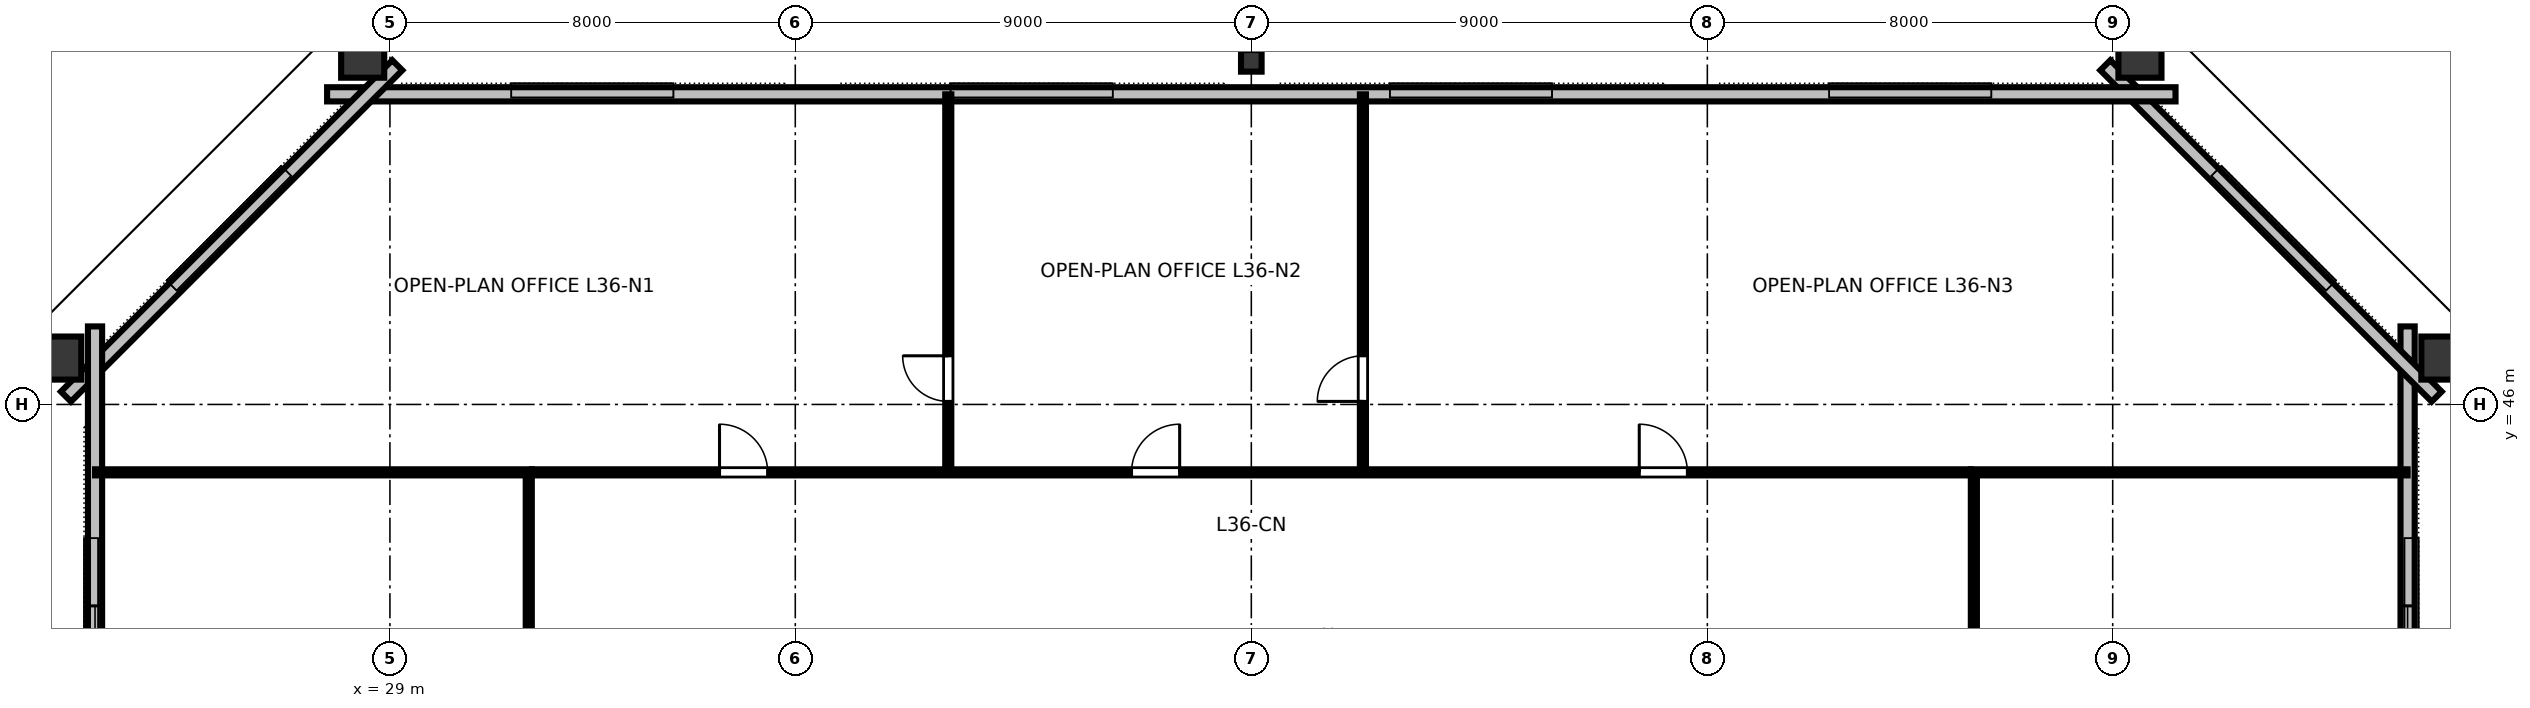
"""IFC4 building model, lengths in metres.
Left out: names, types, materials, properties, quantities, classifications, styles, units other than length and angle.
Written with IfcOpenShell. Run it as: python <this file> out.ifc"""

import sys

from ifc_helpers import new_model, si_unit, direction, frame, frame_2d, origin, origin_2d, place, context, subcontext, project, spatial, rectangle, hollow_rectangle, i_section, extrude, element, fill, save


model = new_model("IFC4")
c1 = context("Model", 3, precision=1e-05, world=origin(), true_north=direction((0.0, 1.0)))
c2 = subcontext(c1, "Body", "Model", "MODEL_VIEW")
j1 = project(units=[si_unit("LENGTHUNIT", "METRE"), si_unit("PLANEANGLEUNIT", "RADIAN")], contexts=[c1])
p1 = place(None, origin())
s1 = spatial("IfcSite", under=j1, at=p1, CompositionType="ELEMENT")
p2 = place(p1, origin())
s2 = spatial("IfcBuilding", under=s1, at=p2, CompositionType="ELEMENT")
p3 = place(p2, frame((0.0, 0.0, 138.4)))
s3 = spatial("IfcBuildingStorey", under=s2, at=p3, CompositionType="ELEMENT", Elevation=138.4)
for number, where, z_axis, x_axis in (
    (1, (69.591, 46.915, 0.0), (0.0, 0.0, 1.0), (0.0, 1.0, 0.0)),
    (2, (63.538, 52.948, 0.0), (0.0, 0.0, 1.0), (1.0, 0.0, 0.0)),
):
    element("IfcColumn", number, at=place(p3, frame(where, z_axis=z_axis, x_axis=x_axis)), inside=s3, PredefinedType="COLUMN", context=c2, shape_type="SweptSolid", body=[
        extrude(hollow_rectangle(XDim=0.85, YDim=1.0, WallThickness=0.05, at=origin_2d()), origin(), (0.0, 0.0, 1.0), 3.358),
    ])
p4 = place(p3, frame((46.0, 52.78, 0.0), z_axis=(0.0, 0.0, 1.0), x_axis=(1.0, 0.0, 0.0)))
e3 = element("IfcColumn", 3, at=p4, inside=s3, PredefinedType="COLUMN", context=c2, shape_type="SweptSolid", body=[
    extrude(i_section(OverallWidth=0.406, OverallDepth=0.425, WebThickness=0.033, FlangeThickness=0.052, FilletRadius=0.025, at=origin_2d()), origin(), (0.0, 0.0, 1.0), 3.358),
])
for number, where, z_axis, x_axis in (
    (4, (28.462, 52.948, 0.0), (0.0, 0.0, 1.0), (1.0, 0.0, 0.0)),
    (5, (22.409, 46.915, 0.0), (0.0, 0.0, 1.0), (0.0, 1.0, 0.0)),
):
    element("IfcColumn", number, at=place(p3, frame(where, z_axis=z_axis, x_axis=x_axis)), inside=s3, PredefinedType="COLUMN", context=c2, shape_type="SweptSolid", body=[
        extrude(hollow_rectangle(XDim=0.85, YDim=1.0, WallThickness=0.05, at=origin_2d()), origin(), (0.0, 0.0, 1.0), 3.358),
    ])
p5 = place(p3, frame((68.82, 16.46, 0.0), z_axis=(0.0, 0.0, 1.0), x_axis=(0.0, 1.0, 0.0)))
e6 = element("IfcWall", 6, at=p5, inside=s3, PredefinedType="STANDARD", context=c2, shape_type="SweptSolid", body=[
    extrude(rectangle(XDim=31.08, YDim=0.28, at=frame_2d((15.54, 0.0))), origin(), (0.0, 0.0, 1.0), 3.36),
])
p6 = place(p5, frame((11.86, 0.0, 0.0)))
e7 = element("IfcOpeningElement", 7, at=p6, cuts=e6, PredefinedType="OPENING", context=c2, shape_type="SweptSolid", body=[
    extrude(rectangle(XDim=1.4, YDim=2.15, at=frame_2d((0.7, 1.075))), frame((0.0, 0.15, 0.0), z_axis=(0.0, -1.0, 0.0), x_axis=(1.0, 0.0, 0.0)), (0.0, 0.0, 1.0), 0.3),
])
p7 = place(p5, frame((5.515, 0.0, 0.8)))
e8 = element("IfcOpeningElement", 8, at=p7, cuts=e6, PredefinedType="OPENING", context=c2, shape_type="SweptSolid", body=[
    extrude(rectangle(XDim=2.0, YDim=1.95, at=frame_2d((1.0, 0.975))), frame((0.0, 0.15, 0.0), z_axis=(0.0, -1.0, 0.0), x_axis=(1.0, 0.0, 0.0)), (0.0, 0.0, 1.0), 0.3),
])
p8 = place(p5, frame((9.125, 0.0, 0.8)))
e9 = element("IfcOpeningElement", 9, at=p8, cuts=e6, PredefinedType="OPENING", context=c2, shape_type="SweptSolid", body=[
    extrude(rectangle(XDim=2.0, YDim=1.95, at=frame_2d((1.0, 0.975))), frame((0.0, 0.15, 0.0), z_axis=(0.0, -1.0, 0.0), x_axis=(1.0, 0.0, 0.0)), (0.0, 0.0, 1.0), 0.3),
])
p9 = place(p5, frame((19.955, 0.0, 0.8)))
e10 = element("IfcOpeningElement", 10, at=p9, cuts=e6, PredefinedType="OPENING", context=c2, shape_type="SweptSolid", body=[
    extrude(rectangle(XDim=2.0, YDim=1.95, at=frame_2d((1.0, 0.975))), frame((0.0, 0.15, 0.0), z_axis=(0.0, -1.0, 0.0), x_axis=(1.0, 0.0, 0.0)), (0.0, 0.0, 1.0), 0.3),
])
p10 = place(p5, frame((23.565, 0.0, 0.8)))
e11 = element("IfcOpeningElement", 11, at=p10, cuts=e6, PredefinedType="OPENING", context=c2, shape_type="SweptSolid", body=[
    extrude(rectangle(XDim=2.0, YDim=1.95, at=frame_2d((1.0, 0.975))), frame((0.0, 0.15, 0.0), z_axis=(0.0, -1.0, 0.0), x_axis=(1.0, 0.0, 0.0)), (0.0, 0.0, 1.0), 0.3),
])
p11 = place(p3, frame((69.394, 46.155, 0.0), z_axis=(0.0, 0.0, 1.0), x_axis=(-0.707106781187, 0.707106781187, 0.0)))
e12 = element("IfcWall", 12, at=p11, inside=s3, PredefinedType="STANDARD", context=c2, shape_type="SweptSolid", body=[
    extrude(rectangle(XDim=9.248, YDim=0.28, at=frame_2d((4.624, 0.0))), origin(), (0.0, 0.0, 1.0), 3.36),
])
p12 = place(p3, frame((64.24, 52.12, 0.0), z_axis=(0.0, 0.0, 1.0), x_axis=(-1.0, 0.0, 0.0)))
e13 = element("IfcWall", 13, at=p12, inside=s3, PredefinedType="STANDARD", context=c2, shape_type="SweptSolid", body=[
    extrude(rectangle(XDim=36.48, YDim=0.28, at=frame_2d((18.24, 0.0))), origin(), (0.0, 0.0, 1.0), 3.36),
])
p13 = place(p3, frame((29.146, 52.694, 0.0), z_axis=(0.0, 0.0, 1.0), x_axis=(-0.707106781187, -0.707106781187, 0.0)))
e14 = element("IfcWall", 14, at=p13, inside=s3, PredefinedType="STANDARD", context=c2, shape_type="SweptSolid", body=[
    extrude(rectangle(XDim=9.248, YDim=0.28, at=frame_2d((4.624, 0.0))), origin(), (0.0, 0.0, 1.0), 3.36),
])
p14 = place(p3, frame((23.18, 47.54, 0.0), z_axis=(0.0, 0.0, 1.0), x_axis=(0.0, -1.0, 0.0)))
e15 = element("IfcWall", 15, at=p14, inside=s3, PredefinedType="STANDARD", context=c2, shape_type="SweptSolid", body=[
    extrude(rectangle(XDim=31.08, YDim=0.28, at=frame_2d((15.54, 0.0))), origin(), (0.0, 0.0, 1.0), 3.36),
])
p15 = place(p14, frame((11.86, 0.0, 0.0)))
e16 = element("IfcOpeningElement", 16, at=p15, cuts=e15, PredefinedType="OPENING", context=c2, shape_type="SweptSolid", body=[
    extrude(rectangle(XDim=1.4, YDim=2.15, at=frame_2d((0.7, 1.075))), frame((0.0, 0.15, 0.0), z_axis=(0.0, -1.0, 0.0), x_axis=(1.0, 0.0, 0.0)), (0.0, 0.0, 1.0), 0.3),
])
p16 = place(p14, frame((5.515, 0.0, 0.8)))
e17 = element("IfcOpeningElement", 17, at=p16, cuts=e15, PredefinedType="OPENING", context=c2, shape_type="SweptSolid", body=[
    extrude(rectangle(XDim=2.0, YDim=1.95, at=frame_2d((1.0, 0.975))), frame((0.0, 0.15, 0.0), z_axis=(0.0, -1.0, 0.0), x_axis=(1.0, 0.0, 0.0)), (0.0, 0.0, 1.0), 0.3),
])
p17 = place(p14, frame((9.125, 0.0, 0.8)))
e18 = element("IfcOpeningElement", 18, at=p17, cuts=e15, PredefinedType="OPENING", context=c2, shape_type="SweptSolid", body=[
    extrude(rectangle(XDim=2.0, YDim=1.95, at=frame_2d((1.0, 0.975))), frame((0.0, 0.15, 0.0), z_axis=(0.0, -1.0, 0.0), x_axis=(1.0, 0.0, 0.0)), (0.0, 0.0, 1.0), 0.3),
])
p18 = place(p14, frame((19.955, 0.0, 0.8)))
e19 = element("IfcOpeningElement", 19, at=p18, cuts=e15, PredefinedType="OPENING", context=c2, shape_type="SweptSolid", body=[
    extrude(rectangle(XDim=2.0, YDim=1.95, at=frame_2d((1.0, 0.975))), frame((0.0, 0.15, 0.0), z_axis=(0.0, -1.0, 0.0), x_axis=(1.0, 0.0, 0.0)), (0.0, 0.0, 1.0), 0.3),
])
p19 = place(p14, frame((23.565, 0.0, 0.8)))
e20 = element("IfcOpeningElement", 20, at=p19, cuts=e15, PredefinedType="OPENING", context=c2, shape_type="SweptSolid", body=[
    extrude(rectangle(XDim=2.0, YDim=1.95, at=frame_2d((1.0, 0.975))), frame((0.0, 0.15, 0.0), z_axis=(0.0, -1.0, 0.0), x_axis=(1.0, 0.0, 0.0)), (0.0, 0.0, 1.0), 0.3),
])
p20 = place(p3, frame((40.019, 44.66, 0.0), z_axis=(0.0, 0.0, 1.0), x_axis=(0.0, 1.0, 0.0)))
e21 = element("IfcWall", 21, at=p20, inside=s3, PredefinedType="PARTITIONING", context=c2, shape_type="SweptSolid", body=[
    extrude(rectangle(XDim=7.46, YDim=0.12, at=frame_2d((3.73, 0.0))), origin(), (0.0, 0.0, 1.0), 2.64),
])
p21 = place(p20, frame((1.4, 0.0, 0.0)))
e22 = element("IfcOpeningElement", 22, at=p21, cuts=e21, PredefinedType="OPENING", context=c2, shape_type="SweptSolid", body=[
    extrude(rectangle(XDim=0.9, YDim=2.15, at=frame_2d((0.45, 1.075))), frame((0.0, 0.07, 0.0), z_axis=(0.0, -1.0, 0.0), x_axis=(1.0, 0.0, 0.0)), (0.0, 0.0, 1.0), 0.14),
])
p22 = place(p3, frame((48.202, 44.66, 0.0), z_axis=(0.0, 0.0, 1.0), x_axis=(0.0, 1.0, 0.0)))
e23 = element("IfcWall", 23, at=p22, inside=s3, PredefinedType="PARTITIONING", context=c2, shape_type="SweptSolid", body=[
    extrude(rectangle(XDim=7.46, YDim=0.12, at=frame_2d((3.73, 0.0))), origin(), (0.0, 0.0, 1.0), 2.64),
])
p23 = place(p22, frame((1.4, 0.0, 0.0)))
e24 = element("IfcOpeningElement", 24, at=p23, cuts=e23, PredefinedType="OPENING", context=c2, shape_type="SweptSolid", body=[
    extrude(rectangle(XDim=0.9, YDim=2.15, at=frame_2d((0.45, 1.075))), frame((0.0, 0.07, 0.0), z_axis=(0.0, -1.0, 0.0), x_axis=(1.0, 0.0, 0.0)), (0.0, 0.0, 1.0), 0.14),
])
p24 = place(p3, frame((31.8, 44.66, 0.0), z_axis=(0.0, 0.0, 1.0), x_axis=(1.0, 0.0, 0.0)))
e25 = element("IfcWall", 25, at=p24, inside=s3, PredefinedType="PARTITIONING", context=c2, shape_type="SweptSolid", body=[
    extrude(rectangle(XDim=28.4, YDim=0.12, at=frame_2d((14.2, 0.0))), origin(), (0.0, 0.0, 1.0), 2.64),
])
p25 = place(p24, frame((3.705, 0.0, 0.0)))
e26 = element("IfcOpeningElement", 26, at=p25, cuts=e25, PredefinedType="OPENING", context=c2, shape_type="SweptSolid", body=[
    extrude(rectangle(XDim=0.95, YDim=2.15, at=frame_2d((0.475, 1.075))), frame((0.0, 0.07, 0.0), z_axis=(0.0, -1.0, 0.0), x_axis=(1.0, 0.0, 0.0)), (0.0, 0.0, 1.0), 0.14),
])
p26 = place(p24, frame((11.836, 0.0, 0.0)))
e27 = element("IfcOpeningElement", 27, at=p26, cuts=e25, PredefinedType="OPENING", context=c2, shape_type="SweptSolid", body=[
    extrude(rectangle(XDim=0.95, YDim=2.15, at=frame_2d((0.475, 1.075))), frame((0.0, 0.07, 0.0), z_axis=(0.0, -1.0, 0.0), x_axis=(1.0, 0.0, 0.0)), (0.0, 0.0, 1.0), 0.14),
])
p27 = place(p24, frame((21.856, 0.0, 0.0)))
e28 = element("IfcOpeningElement", 28, at=p27, cuts=e25, PredefinedType="OPENING", context=c2, shape_type="SweptSolid", body=[
    extrude(rectangle(XDim=0.95, YDim=2.15, at=frame_2d((0.475, 1.075))), frame((0.0, 0.07, 0.0), z_axis=(0.0, -1.0, 0.0), x_axis=(1.0, 0.0, 0.0)), (0.0, 0.0, 1.0), 0.14),
])
p28 = place(p3, frame((31.74, 33.02, 0.0), z_axis=(0.0, 0.0, 1.0), x_axis=(0.0, 1.0, 0.0)))
e29 = element("IfcWall", 29, at=p28, inside=s3, PredefinedType="PARTITIONING", context=c2, shape_type="SweptSolid", body=[
    extrude(rectangle(XDim=11.58, YDim=0.12, at=frame_2d((5.79, 0.0))), origin(), (0.0, 0.0, 1.0), 2.64),
])
p29 = place(p28, frame((5.215, 0.0, 0.0)))
e30 = element("IfcOpeningElement", 30, at=p29, cuts=e29, PredefinedType="OPENING", context=c2, shape_type="SweptSolid", body=[
    extrude(rectangle(XDim=0.95, YDim=2.15, at=frame_2d((0.475, 1.075))), frame((0.0, 0.07, 0.0), z_axis=(0.0, -1.0, 0.0), x_axis=(1.0, 0.0, 0.0)), (0.0, 0.0, 1.0), 0.14),
])
p30 = place(p3, frame((60.26, 33.02, 0.0), z_axis=(0.0, 0.0, 1.0), x_axis=(0.0, 1.0, 0.0)))
e31 = element("IfcWall", 31, at=p30, inside=s3, PredefinedType="PARTITIONING", context=c2, shape_type="SweptSolid", body=[
    extrude(rectangle(XDim=11.58, YDim=0.12, at=frame_2d((5.79, 0.0))), origin(), (0.0, 0.0, 1.0), 2.64),
])
p31 = place(p30, frame((5.775, 0.0, 0.0)))
e32 = element("IfcOpeningElement", 32, at=p31, cuts=e31, PredefinedType="OPENING", context=c2, shape_type="SweptSolid", body=[
    extrude(rectangle(XDim=0.95, YDim=2.15, at=frame_2d((0.475, 1.075))), frame((0.0, 0.07, 0.0), z_axis=(0.0, -1.0, 0.0), x_axis=(1.0, 0.0, 0.0)), (0.0, 0.0, 1.0), 0.14),
])
for number, where, z_axis, x_axis in (
    (33, (31.8, 44.66, 0.0), (0.0, 0.0, 1.0), (-1.0, 0.0, 0.0)),
    (34, (60.2, 44.66, 0.0), (0.0, 0.0, 1.0), (1.0, 0.0, 0.0)),
):
    element("IfcWall", number, at=place(p3, frame(where, z_axis=z_axis, x_axis=x_axis)), inside=s3, PredefinedType="PARTITIONING", context=c2, shape_type="SweptSolid", body=[
        extrude(rectangle(XDim=8.62, YDim=0.12, at=frame_2d((4.31, 0.0))), origin(), (0.0, 0.0, 1.0), 2.64),
    ])
p32 = place(p10, origin())
e35 = element("IfcWindow", 35, at=p32, inside=s3, PartitioningType="SINGLE_PANEL", PredefinedType="WINDOW", context=c2, shape_type="SweptSolid", body=[
    extrude(rectangle(XDim=2.0, YDim=1.95, at=frame_2d((1.0, 0.975))), frame((0.0, 0.03, 0.0), z_axis=(0.0, -1.0, 0.0), x_axis=(1.0, 0.0, 0.0)), (0.0, 0.0, 1.0), 0.06),
])
fill(e11, e35)
p33 = place(p16, origin())
e36 = element("IfcWindow", 36, at=p33, inside=s3, PartitioningType="SINGLE_PANEL", PredefinedType="WINDOW", context=c2, shape_type="SweptSolid", body=[
    extrude(rectangle(XDim=2.0, YDim=1.95, at=frame_2d((1.0, 0.975))), frame((0.0, 0.03, 0.0), z_axis=(0.0, -1.0, 0.0), x_axis=(1.0, 0.0, 0.0)), (0.0, 0.0, 1.0), 0.06),
])
fill(e17, e36)
p34 = place(p21, origin())
e37 = element("IfcDoor", 37, at=p34, inside=s3, OperationType="SINGLE_SWING_RIGHT", PredefinedType="DOOR", context=c2, shape_type="SweptSolid", body=[
    extrude(rectangle(XDim=0.9, YDim=2.15, at=frame_2d((0.45, 1.075))), frame((0.0, 0.025, 0.0), z_axis=(0.0, -1.0, 0.0), x_axis=(1.0, 0.0, 0.0)), (0.0, 0.0, 1.0), 0.05),
])
fill(e22, e37)
p35 = place(p23, origin())
e38 = element("IfcDoor", 38, at=p35, inside=s3, OperationType="SINGLE_SWING_LEFT", PredefinedType="DOOR", context=c2, shape_type="SweptSolid", body=[
    extrude(rectangle(XDim=0.9, YDim=2.15, at=frame_2d((0.45, 1.075))), frame((0.0, 0.025, 0.0), z_axis=(0.0, -1.0, 0.0), x_axis=(1.0, 0.0, 0.0)), (0.0, 0.0, 1.0), 0.05),
])
fill(e24, e38)
p36 = place(p25, origin())
e39 = element("IfcDoor", 39, at=p36, inside=s3, OperationType="SINGLE_SWING_LEFT", PredefinedType="DOOR", context=c2, shape_type="SweptSolid", body=[
    extrude(rectangle(XDim=0.95, YDim=2.15, at=frame_2d((0.475, 1.075))), frame((0.0, 0.025, 0.0), z_axis=(0.0, -1.0, 0.0), x_axis=(1.0, 0.0, 0.0)), (0.0, 0.0, 1.0), 0.05),
])
fill(e26, e39)
p37 = place(p26, origin())
e40 = element("IfcDoor", 40, at=p37, inside=s3, OperationType="SINGLE_SWING_RIGHT", PredefinedType="DOOR", context=c2, shape_type="SweptSolid", body=[
    extrude(rectangle(XDim=0.95, YDim=2.15, at=frame_2d((0.475, 1.075))), frame((0.0, 0.025, 0.0), z_axis=(0.0, -1.0, 0.0), x_axis=(1.0, 0.0, 0.0)), (0.0, 0.0, 1.0), 0.05),
])
fill(e27, e40)
p38 = place(p27, origin())
e41 = element("IfcDoor", 41, at=p38, inside=s3, OperationType="SINGLE_SWING_LEFT", PredefinedType="DOOR", context=c2, shape_type="SweptSolid", body=[
    extrude(rectangle(XDim=0.95, YDim=2.15, at=frame_2d((0.475, 1.075))), frame((0.0, 0.025, 0.0), z_axis=(0.0, -1.0, 0.0), x_axis=(1.0, 0.0, 0.0)), (0.0, 0.0, 1.0), 0.05),
])
fill(e28, e41)
save(model, sys.argv[1])
